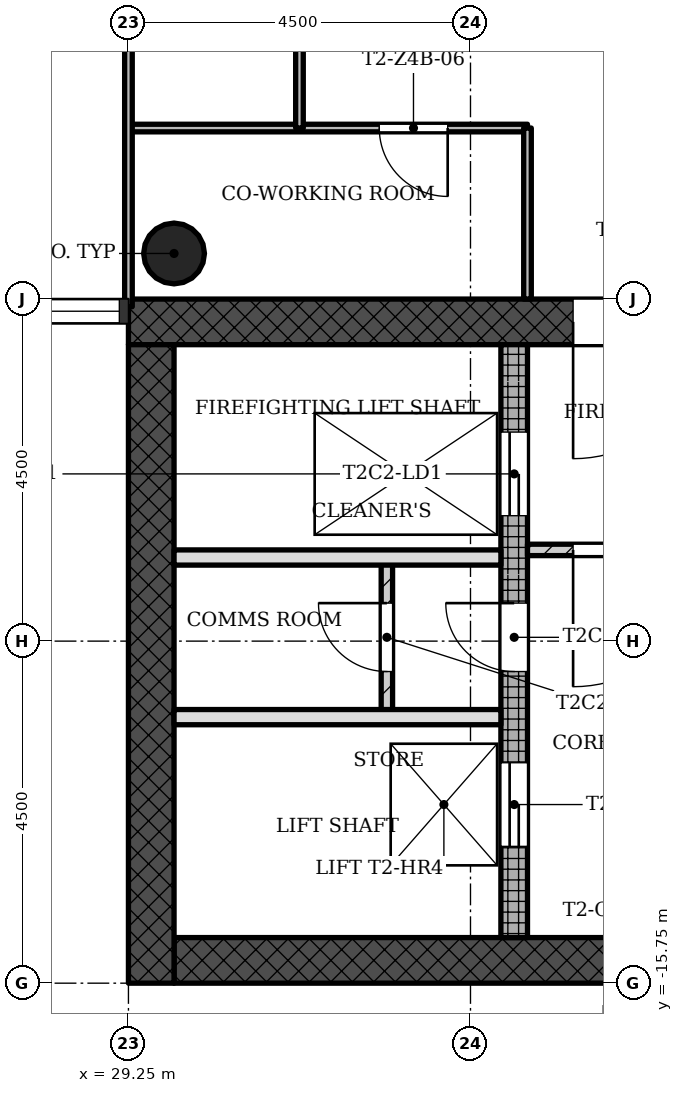
"""IFC4 building model, lengths in metres.
Left out: names, types, materials, properties, quantities, classifications, styles, units other than length and angle.
Written with IfcOpenShell. Run it as: python <this file> out.ifc"""

import sys

from ifc_helpers import new_model, si_unit, direction, frame, frame_2d, origin, origin_2d, place, context, subcontext, project, spatial, rectangle, hollow_circle, extrude, element, fill, save


model = new_model("IFC4")
c1 = context("Model", 3, precision=1e-05, world=origin(), true_north=direction((0.0, 1.0)))
c2 = subcontext(c1, "Body", "Model", "MODEL_VIEW")
j1 = project(units=[si_unit("LENGTHUNIT", "METRE"), si_unit("PLANEANGLEUNIT", "RADIAN")], contexts=[c1])
p1 = place(None, origin())
s1 = spatial("IfcSite", under=j1, at=p1, CompositionType="ELEMENT")
p2 = place(p1, origin())
s2 = spatial("IfcBuilding", under=s1, at=p2, CompositionType="ELEMENT")
p3 = place(p2, frame((0.0, 0.0, 230.0)))
s3 = spatial("IfcBuildingStorey", under=s2, at=p3, CompositionType="ELEMENT", Elevation=230.0)
p4 = place(p3, frame((29.85, -15.45, 0.0), z_axis=(0.0, 0.0, 1.0), x_axis=(1.0, 0.0, 0.0)))
e1 = element("IfcWall", 1, at=p4, inside=s3, PredefinedType="SHEAR", context=c2, shape_type="SweptSolid", body=[
    extrude(rectangle(XDim=12.9, YDim=0.6, at=frame_2d((6.45, 0.0))), origin(), (0.0, 0.0, 1.0), 3.4),
])
p5 = place(p4, frame((5.7, 0.0, 0.45)))
e2 = element("IfcOpeningElement", 2, at=p5, cuts=e1, PredefinedType="OPENING", context=c2, shape_type="SweptSolid", body=[
    extrude(rectangle(XDim=0.9, YDim=2.4, at=frame_2d((0.45, 1.2))), frame((0.0, 0.31, 0.0), z_axis=(0.0, -1.0, 0.0), x_axis=(1.0, 0.0, 0.0)), (0.0, 0.0, 1.0), 0.62),
])
p6 = place(p3, frame((42.15, -7.05, 0.0), z_axis=(0.0, 0.0, 1.0), x_axis=(-1.0, 0.0, 0.0)))
e3 = element("IfcWall", 3, at=p6, inside=s3, PredefinedType="SHEAR", context=c2, shape_type="SweptSolid", body=[
    extrude(rectangle(XDim=12.9, YDim=0.6, at=frame_2d((6.45, 0.0))), origin(), (0.0, 0.0, 1.0), 3.4),
])
p7 = place(p6, frame((5.25, 0.0, 0.0)))
e4 = element("IfcOpeningElement", 4, at=p7, cuts=e3, PredefinedType="OPENING", context=c2, shape_type="SweptSolid", body=[
    extrude(rectangle(XDim=1.8, YDim=2.1, at=frame_2d((0.9, 1.05))), frame((0.0, 0.31, 0.0), z_axis=(0.0, -1.0, 0.0), x_axis=(1.0, 0.0, 0.0)), (0.0, 0.0, 1.0), 0.62),
])
p8 = place(p3, frame((29.55, -7.35, 0.0), z_axis=(0.0, 0.0, 1.0), x_axis=(0.0, -1.0, 0.0)))
e5 = element("IfcWall", 5, at=p8, inside=s3, PredefinedType="SHEAR", context=c2, shape_type="SweptSolid", body=[
    extrude(rectangle(XDim=8.4, YDim=0.6, at=frame_2d((4.2, 0.0))), origin(), (0.0, 0.0, 1.0), 3.4),
])
p9 = place(p3, frame((34.325, -15.15, 0.0), z_axis=(0.0, 0.0, 1.0), x_axis=(0.0, 1.0, 0.0)))
e6 = element("IfcWall", 6, at=p9, inside=s3, PredefinedType="SHEAR", context=c2, shape_type="SweptSolid", body=[
    extrude(rectangle(XDim=7.8, YDim=0.35, at=frame_2d((3.9, 0.0))), origin(), (0.0, 0.0, 1.0), 3.4),
])
p10 = place(p9, frame((5.55, 0.0, 0.0)))
e7 = element("IfcOpeningElement", 7, at=p10, cuts=e6, PredefinedType="OPENING", context=c2, shape_type="SweptSolid", body=[
    extrude(rectangle(XDim=1.1, YDim=2.1, at=frame_2d((0.55, 1.05))), frame((0.0, 0.185, 0.0), z_axis=(0.0, -1.0, 0.0), x_axis=(1.0, 0.0, 0.0)), (0.0, 0.0, 1.0), 0.37),
])
p11 = place(p9, frame((1.2, 0.0, 0.0)))
e8 = element("IfcOpeningElement", 8, at=p11, cuts=e6, PredefinedType="OPENING", context=c2, shape_type="SweptSolid", body=[
    extrude(rectangle(XDim=1.1, YDim=2.1, at=frame_2d((0.55, 1.05))), frame((0.0, 0.185, 0.0), z_axis=(0.0, -1.0, 0.0), x_axis=(1.0, 0.0, 0.0)), (0.0, 0.0, 1.0), 0.37),
])
p12 = place(p9, frame((3.5, 0.0, 0.0)))
e9 = element("IfcOpeningElement", 9, at=p12, cuts=e6, PredefinedType="OPENING", context=c2, shape_type="SweptSolid", body=[
    extrude(rectangle(XDim=0.9, YDim=2.1, at=frame_2d((0.45, 1.05))), frame((0.0, 0.185, 0.0), z_axis=(0.0, -1.0, 0.0), x_axis=(1.0, 0.0, 0.0)), (0.0, 0.0, 1.0), 0.37),
])
p13 = place(p3, frame((29.85, -6.15, 0.0), z_axis=(0.0, 0.0, 1.0), x_axis=(1.0, 0.0, 0.0)))
e10 = element("IfcColumn", 10, at=p13, inside=s3, PredefinedType="COLUMN", context=c2, shape_type="SweptSolid", body=[
    extrude(hollow_circle(Radius=0.4, WallThickness=0.028, at=origin_2d()), origin(), (0.0, 0.0, 1.0), 3.4),
])
p14 = place(p3, frame((34.5, -10.05, 0.0), z_axis=(0.0, 0.0, 1.0), x_axis=(1.0, 0.0, 0.0)))
e11 = element("IfcWall", 11, at=p14, inside=s3, PredefinedType="PARTITIONING", context=c2, shape_type="SweptSolid", body=[
    extrude(rectangle(XDim=3.0, YDim=0.15, at=frame_2d((1.5, 0.0))), origin(), (0.0, 0.0, 1.0), 2.98),
])
p15 = place(p14, frame((0.6, 0.0, 0.0)))
e12 = element("IfcOpeningElement", 12, at=p15, cuts=e11, PredefinedType="OPENING", context=c2, shape_type="SweptSolid", body=[
    extrude(rectangle(XDim=1.8, YDim=2.1, at=frame_2d((0.9, 1.05))), frame((0.0, 0.085, 0.0), z_axis=(0.0, -1.0, 0.0), x_axis=(1.0, 0.0, 0.0)), (0.0, 0.0, 1.0), 0.17),
])
for number, where, z_axis, x_axis in (
    (13, (29.85, -12.25, 0.0), (0.0, 0.0, 1.0), (1.0, 0.0, 0.0)),
    (14, (29.85, -10.15, 0.0), (0.0, 0.0, 1.0), (1.0, 0.0, 0.0)),
):
    element("IfcWall", number, at=place(p3, frame(where, z_axis=z_axis, x_axis=x_axis)), inside=s3, PredefinedType="SOLIDWALL", context=c2, shape_type="SweptSolid", body=[
        extrude(rectangle(XDim=4.3, YDim=0.2, at=frame_2d((2.15, 0.0))), origin(), (0.0, 0.0, 1.0), 2.98),
    ])
p16 = place(p3, frame((32.65, -10.15, 0.0), z_axis=(0.0, 0.0, 1.0), x_axis=(0.0, -1.0, 0.0)))
e15 = element("IfcWall", 15, at=p16, inside=s3, PredefinedType="PARTITIONING", context=c2, shape_type="SweptSolid", body=[
    extrude(rectangle(XDim=2.1, YDim=0.15, at=frame_2d((1.05, 0.0))), origin(), (0.0, 0.0, 1.0), 2.98),
])
p17 = place(p16, frame((0.6, 0.0, 0.0)))
e16 = element("IfcOpeningElement", 16, at=p17, cuts=e15, PredefinedType="OPENING", context=c2, shape_type="SweptSolid", body=[
    extrude(rectangle(XDim=0.9, YDim=2.1, at=frame_2d((0.45, 1.05))), frame((0.0, 0.085, 0.0), z_axis=(0.0, -1.0, 0.0), x_axis=(1.0, 0.0, 0.0)), (0.0, 0.0, 1.0), 0.17),
])
p18 = place(p3, frame((34.5, -4.5, 0.0), z_axis=(0.0, 0.0, 1.0), x_axis=(-1.0, 0.0, 0.0)))
e17 = element("IfcWall", 17, at=p18, inside=s3, PredefinedType="PARTITIONING", context=c2, shape_type="SweptSolid", body=[
    extrude(rectangle(XDim=5.25, YDim=0.1, at=frame_2d((2.625, 0.0))), origin(), (0.0, 0.0, 1.0), 2.98),
])
p19 = place(p18, frame((1.05, 0.0, 0.0)))
e18 = element("IfcOpeningElement", 18, at=p19, cuts=e17, PredefinedType="OPENING", context=c2, shape_type="SweptSolid", body=[
    extrude(rectangle(XDim=0.9, YDim=2.1, at=frame_2d((0.45, 1.05))), frame((0.0, 0.06, 0.0), z_axis=(0.0, -1.0, 0.0), x_axis=(1.0, 0.0, 0.0)), (0.0, 0.0, 1.0), 0.12),
])
p20 = place(p3, frame((34.5, -6.75, 0.0), z_axis=(0.0, 0.0, 1.0), x_axis=(0.0, 1.0, 0.0)))
e19 = element("IfcWall", 19, at=p20, inside=s3, PredefinedType="PARTITIONING", context=c2, shape_type="SweptSolid", body=[
    extrude(rectangle(XDim=2.25, YDim=0.1, at=frame_2d((1.125, 0.0))), origin(), (0.0, 0.0, 1.0), 2.98),
])
p21 = place(p3, frame((31.5, -4.5, 0.0), z_axis=(0.0, 0.0, 1.0), x_axis=(0.0, 1.0, 0.0)))
e20 = element("IfcWall", 20, at=p21, inside=s3, PredefinedType="PARTITIONING", context=c2, shape_type="SweptSolid", body=[
    extrude(rectangle(XDim=3.6, YDim=0.1, at=frame_2d((1.8, 0.0))), origin(), (0.0, 0.0, 1.0), 2.98),
])
p22 = place(p21, frame((1.35, 0.0, 0.0)))
e21 = element("IfcOpeningElement", 21, at=p22, cuts=e20, PredefinedType="OPENING", context=c2, shape_type="SweptSolid", body=[
    extrude(rectangle(XDim=0.9, YDim=2.1, at=frame_2d((0.45, 1.05))), frame((0.0, 0.06, 0.0), z_axis=(0.0, -1.0, 0.0), x_axis=(1.0, 0.0, 0.0)), (0.0, 0.0, 1.0), 0.12),
])
p23 = place(p3, frame((29.25, -6.85, 0.0), z_axis=(0.0, 0.0, 1.0), x_axis=(0.0, 1.0, 0.0)))
e22 = element("IfcWall", 22, at=p23, inside=s3, PredefinedType="PARTITIONING", context=c2, shape_type="SweptSolid", body=[
    extrude(rectangle(XDim=5.95, YDim=0.1, at=frame_2d((2.975, 0.0))), origin(), (0.0, 0.0, 1.0), 2.98),
])
p24 = place(p15, origin())
e23 = element("IfcDoor", 23, at=p24, inside=s3, OperationType="SINGLE_SWING_LEFT", PredefinedType="DOOR", context=c2, shape_type="SweptSolid", body=[
    extrude(rectangle(XDim=1.8, YDim=2.1, at=frame_2d((0.9, 1.05))), frame((0.0, 0.025, 0.0), z_axis=(0.0, -1.0, 0.0), x_axis=(1.0, 0.0, 0.0)), (0.0, 0.0, 1.0), 0.05),
])
fill(e12, e23)
p25 = place(p17, origin())
e24 = element("IfcDoor", 24, at=p25, inside=s3, OperationType="SINGLE_SWING_LEFT", PredefinedType="DOOR", context=c2, shape_type="SweptSolid", body=[
    extrude(rectangle(XDim=0.9, YDim=2.1, at=frame_2d((0.45, 1.05))), frame((0.0, 0.025, 0.0), z_axis=(0.0, -1.0, 0.0), x_axis=(1.0, 0.0, 0.0)), (0.0, 0.0, 1.0), 0.05),
])
fill(e16, e24)
p26 = place(p19, origin())
e25 = element("IfcDoor", 25, at=p26, inside=s3, OperationType="SINGLE_SWING_RIGHT", PredefinedType="DOOR", context=c2, shape_type="SweptSolid", body=[
    extrude(rectangle(XDim=0.9, YDim=2.1, at=frame_2d((0.45, 1.05))), frame((0.0, 0.025, 0.0), z_axis=(0.0, -1.0, 0.0), x_axis=(1.0, 0.0, 0.0)), (0.0, 0.0, 1.0), 0.05),
])
fill(e18, e25)
p27 = place(p10, origin())
e26 = element("IfcDoor", 26, at=p27, inside=s3, OperationType="SLIDING_TO_LEFT", PredefinedType="DOOR", context=c2, shape_type="SweptSolid", body=[
    extrude(rectangle(XDim=1.1, YDim=2.1, at=frame_2d((0.55, 1.05))), frame((0.0, 0.025, 0.0), z_axis=(0.0, -1.0, 0.0), x_axis=(1.0, 0.0, 0.0)), (0.0, 0.0, 1.0), 0.05),
])
fill(e7, e26)
p28 = place(p11, origin())
e27 = element("IfcDoor", 27, at=p28, inside=s3, OperationType="SLIDING_TO_LEFT", PredefinedType="DOOR", context=c2, shape_type="SweptSolid", body=[
    extrude(rectangle(XDim=1.1, YDim=2.1, at=frame_2d((0.55, 1.05))), frame((0.0, 0.025, 0.0), z_axis=(0.0, -1.0, 0.0), x_axis=(1.0, 0.0, 0.0)), (0.0, 0.0, 1.0), 0.05),
])
fill(e8, e27)
p29 = place(p12, origin())
e28 = element("IfcDoor", 28, at=p29, inside=s3, OperationType="SINGLE_SWING_LEFT", PredefinedType="DOOR", context=c2, shape_type="SweptSolid", body=[
    extrude(rectangle(XDim=0.9, YDim=2.1, at=frame_2d((0.45, 1.05))), frame((0.0, 0.025, 0.0), z_axis=(0.0, -1.0, 0.0), x_axis=(1.0, 0.0, 0.0)), (0.0, 0.0, 1.0), 0.05),
])
fill(e9, e28)
p30 = place(p7, origin())
e29 = element("IfcDoor", 29, at=p30, inside=s3, OperationType="SINGLE_SWING_LEFT", PredefinedType="DOOR", context=c2, shape_type="SweptSolid", body=[
    extrude(rectangle(XDim=1.8, YDim=2.1, at=frame_2d((0.9, 1.05))), frame((0.0, 0.025, 0.0), z_axis=(0.0, -1.0, 0.0), x_axis=(1.0, 0.0, 0.0)), (0.0, 0.0, 1.0), 0.05),
])
fill(e4, e29)
save(model, sys.argv[1])
